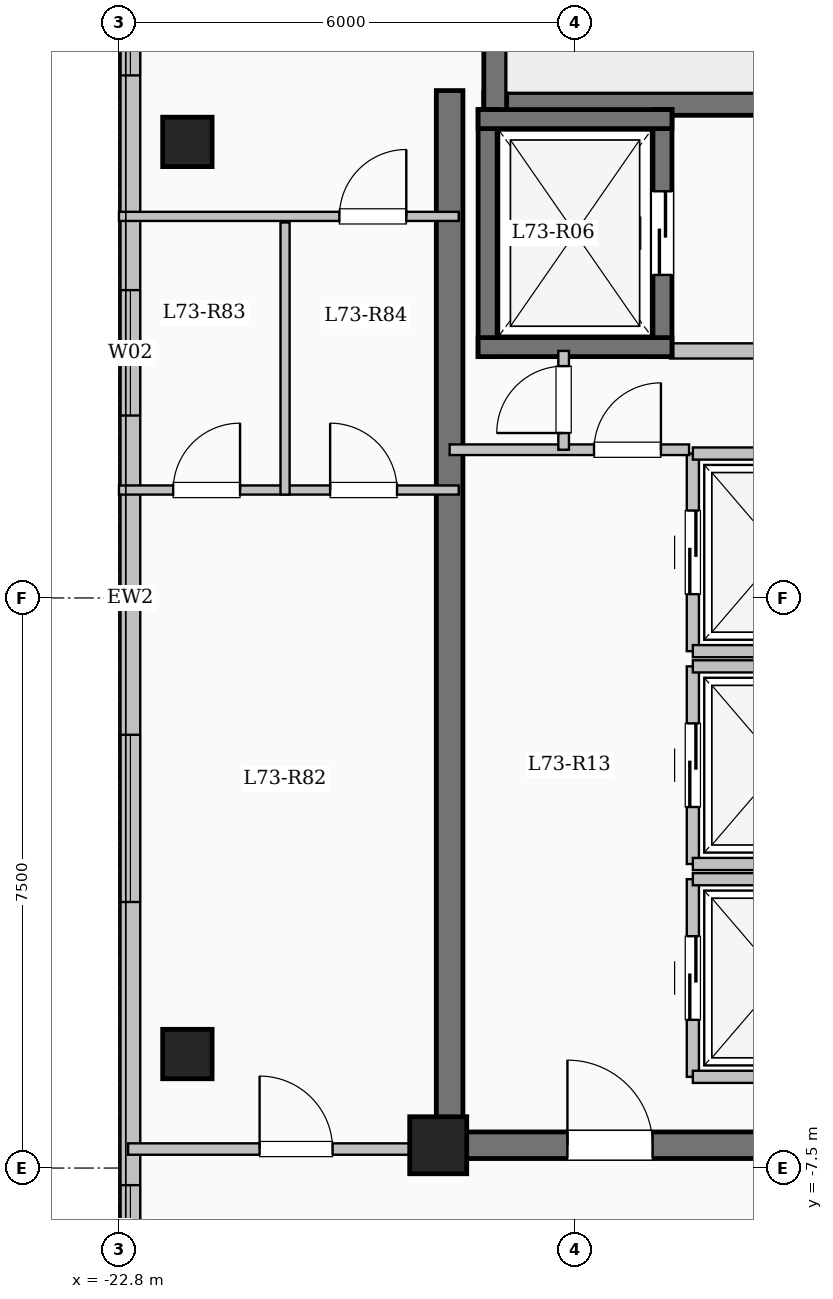
"""IFC4 building model, lengths in metres.
Left out: names, types, materials, properties, quantities, classifications, styles, units other than length and angle.
Written with IfcOpenShell. Run it as: python <this file> out.ifc"""

import sys

from ifc_helpers import new_model, si_unit, direction, frame, frame_2d, origin, origin_2d, place, context, subcontext, project, spatial, rectangle, extrude, element, fill, save


model = new_model("IFC4")
c1 = context("Model", 3, precision=1e-05, world=origin(), true_north=direction((0.0, 1.0)))
c2 = subcontext(c1, "Body", "Model", "MODEL_VIEW")
j1 = project(units=[si_unit("LENGTHUNIT", "METRE"), si_unit("PLANEANGLEUNIT", "RADIAN")], contexts=[c1])
p1 = place(None, origin())
s1 = spatial("IfcSite", under=j1, at=p1, CompositionType="ELEMENT")
p2 = place(p1, origin())
s2 = spatial("IfcBuilding", under=s1, at=p2, CompositionType="ELEMENT")
p3 = place(p2, frame((0.0, 0.0, 268.3)))
s3 = spatial("IfcBuildingStorey", under=s2, at=p3, CompositionType="ELEMENT", Elevation=268.3)
p4 = place(p3, frame((-18.6, -7.2, 0.0), z_axis=(0.0, 0.0, 1.0), x_axis=(1.0, 0.0, 0.0)))
e1 = element("IfcColumn", 1, at=p4, inside=s3, PredefinedType="COLUMN", context=c2, shape_type="SweptSolid", body=[
    extrude(rectangle(XDim=0.75, YDim=0.75, at=origin_2d()), origin(), (0.0, 0.0, 1.0), 3.35),
])
for number, where, z_axis, x_axis in (
    (2, (-21.9, -6.0, 0.0), (0.0, 0.0, 1.0), (1.0, 0.0, 0.0)),
    (3, (-21.9, 6.0, 0.0), (0.0, 0.0, 1.0), (1.0, 0.0, 0.0)),
):
    element("IfcColumn", number, at=place(p3, frame(where, z_axis=z_axis, x_axis=x_axis)), inside=s3, PredefinedType="COLUMN", context=c2, shape_type="SweptSolid", body=[
        extrude(rectangle(XDim=0.65, YDim=0.65, at=origin_2d()), origin(), (0.0, 0.0, 1.0), 3.35),
    ])
p5 = place(p3, frame((-22.65, -17.55, 0.0), z_axis=(0.0, 0.0, 1.0), x_axis=(0.0, 1.0, 0.0)))
e4 = element("IfcWall", 4, at=p5, inside=s3, PredefinedType="SOLIDWALL", context=c2, shape_type="SweptSolid", body=[
    extrude(rectangle(XDim=35.1, YDim=0.26, at=frame_2d((17.55, 0.0))), origin(), (0.0, 0.0, 1.0), 3.05),
])
p6 = place(p5, frame((2.975, 0.0, 0.9)))
e5 = element("IfcOpeningElement", 5, at=p6, cuts=e4, PredefinedType="OPENING", context=c2, shape_type="SweptSolid", body=[
    extrude(rectangle(XDim=2.2, YDim=1.75, at=frame_2d((1.1, 0.875))), frame((0.0, 0.14, 0.0), z_axis=(0.0, -1.0, 0.0), x_axis=(1.0, 0.0, 0.0)), (0.0, 0.0, 1.0), 0.28),
])
p7 = place(p5, frame((8.625, 0.0, 0.95)))
e6 = element("IfcOpeningElement", 6, at=p7, cuts=e4, PredefinedType="OPENING", context=c2, shape_type="SweptSolid", body=[
    extrude(rectangle(XDim=1.2, YDim=1.5, at=frame_2d((0.6, 0.75))), frame((0.0, 0.14, 0.0), z_axis=(0.0, -1.0, 0.0), x_axis=(1.0, 0.0, 0.0)), (0.0, 0.0, 1.0), 0.28),
])
p8 = place(p5, frame((13.55, 0.0, 0.9)))
e7 = element("IfcOpeningElement", 7, at=p8, cuts=e4, PredefinedType="OPENING", context=c2, shape_type="SweptSolid", body=[
    extrude(rectangle(XDim=2.2, YDim=1.75, at=frame_2d((1.1, 0.875))), frame((0.0, 0.14, 0.0), z_axis=(0.0, -1.0, 0.0), x_axis=(1.0, 0.0, 0.0)), (0.0, 0.0, 1.0), 0.28),
])
p9 = place(p5, frame((19.95, 0.0, 0.9)))
e8 = element("IfcOpeningElement", 8, at=p9, cuts=e4, PredefinedType="OPENING", context=c2, shape_type="SweptSolid", body=[
    extrude(rectangle(XDim=1.65, YDim=1.6, at=frame_2d((0.825, 0.8))), frame((0.0, 0.14, 0.0), z_axis=(0.0, -1.0, 0.0), x_axis=(1.0, 0.0, 0.0)), (0.0, 0.0, 1.0), 0.28),
])
p10 = place(p5, frame((24.425, 0.0, 0.9)))
e9 = element("IfcOpeningElement", 9, at=p10, cuts=e4, PredefinedType="OPENING", context=c2, shape_type="SweptSolid", body=[
    extrude(rectangle(XDim=2.0, YDim=1.7, at=frame_2d((1.0, 0.85))), frame((0.0, 0.14, 0.0), z_axis=(0.0, -1.0, 0.0), x_axis=(1.0, 0.0, 0.0)), (0.0, 0.0, 1.0), 0.28),
])
p11 = place(p5, frame((28.675, 0.0, 0.95)))
e10 = element("IfcOpeningElement", 10, at=p11, cuts=e4, PredefinedType="OPENING", context=c2, shape_type="SweptSolid", body=[
    extrude(rectangle(XDim=1.0, YDim=1.5, at=frame_2d((0.5, 0.75))), frame((0.0, 0.14, 0.0), z_axis=(0.0, -1.0, 0.0), x_axis=(1.0, 0.0, 0.0)), (0.0, 0.0, 1.0), 0.28),
])
p12 = place(p5, frame((31.6, 0.0, 0.9)))
e11 = element("IfcOpeningElement", 11, at=p12, cuts=e4, PredefinedType="OPENING", context=c2, shape_type="SweptSolid", body=[
    extrude(rectangle(XDim=2.0, YDim=1.7, at=frame_2d((1.0, 0.85))), frame((0.0, 0.14, 0.0), z_axis=(0.0, -1.0, 0.0), x_axis=(1.0, 0.0, 0.0)), (0.0, 0.0, 1.0), 0.28),
])
p13 = place(p3, frame((-18.0, 6.5, 0.0), z_axis=(0.0, 0.0, 1.0), x_axis=(1.0, 0.0, 0.0)))
e12 = element("IfcWall", 12, at=p13, inside=s3, PredefinedType="SHEAR", context=c2, shape_type="SweptSolid", body=[
    extrude(rectangle(XDim=8.0, YDim=0.3, at=frame_2d((4.0, 0.0))), origin(), (0.0, 0.0, 1.0), 3.35),
])
p14 = place(p13, frame((6.45, 0.0, 0.0)))
e13 = element("IfcOpeningElement", 13, at=p14, cuts=e12, PredefinedType="OPENING", context=c2, shape_type="SweptSolid", body=[
    extrude(rectangle(XDim=1.0, YDim=2.15, at=frame_2d((0.5, 1.075))), frame((0.0, 0.16, 0.0), z_axis=(0.0, -1.0, 0.0), x_axis=(1.0, 0.0, 0.0)), (0.0, 0.0, 1.0), 0.32),
])
p15 = place(p3, frame((-17.85, 6.35, 0.0), z_axis=(0.0, 0.0, 1.0), x_axis=(0.0, 1.0, 0.0)))
e14 = element("IfcWall", 14, at=p15, inside=s3, PredefinedType="SHEAR", context=c2, shape_type="SweptSolid", body=[
    extrude(rectangle(XDim=3.59, YDim=0.3, at=frame_2d((1.795, 0.0))), origin(), (0.0, 0.0, 1.0), 3.35),
])
p16 = place(p3, frame((-15.55, 3.25, 0.0), z_axis=(0.0, 0.0, 1.0), x_axis=(1.0, 0.0, 0.0)))
e15 = element("IfcWall", 15, at=p16, inside=s3, PredefinedType="SOLIDWALL", context=c2, shape_type="SweptSolid", body=[
    extrude(rectangle(XDim=5.4, YDim=0.2, at=frame_2d((2.7, 0.0))), origin(), (0.0, 0.0, 1.0), 3.05),
])
p17 = place(p3, frame((-17.95, 3.175, 0.0), z_axis=(0.0, 0.0, 1.0), x_axis=(0.0, 1.0, 0.0)))
e16 = element("IfcWall", 16, at=p17, inside=s3, PredefinedType="SHEAR", context=c2, shape_type="SweptSolid", body=[
    extrude(rectangle(XDim=3.25, YDim=0.25, at=frame_2d((1.625, 0.0))), origin(), (0.0, 0.0, 1.0), 3.35),
])
p18 = place(p3, frame((-15.65, 3.175, 0.0), z_axis=(0.0, 0.0, 1.0), x_axis=(0.0, 1.0, 0.0)))
e17 = element("IfcWall", 17, at=p18, inside=s3, PredefinedType="SHEAR", context=c2, shape_type="SweptSolid", body=[
    extrude(rectangle(XDim=3.25, YDim=0.25, at=frame_2d((1.625, 0.0))), origin(), (0.0, 0.0, 1.0), 3.35),
])
p19 = place(p18, frame((1.075, 0.0, 0.0)))
e18 = element("IfcOpeningElement", 18, at=p19, cuts=e17, PredefinedType="OPENING", context=c2, shape_type="SweptSolid", body=[
    extrude(rectangle(XDim=1.1, YDim=2.15, at=frame_2d((0.55, 1.075))), frame((0.0, 0.135, 0.0), z_axis=(0.0, -1.0, 0.0), x_axis=(1.0, 0.0, 0.0)), (0.0, 0.0, 1.0), 0.27),
])
for number, where, z_axis, x_axis in (
    (19, (-18.075, 3.3, 0.0), (0.0, 0.0, 1.0), (1.0, 0.0, 0.0)),
    (20, (-18.075, 6.3, 0.0), (0.0, 0.0, 1.0), (1.0, 0.0, 0.0)),
):
    element("IfcWall", number, at=place(p3, frame(where, z_axis=z_axis, x_axis=x_axis)), inside=s3, PredefinedType="SHEAR", context=c2, shape_type="SweptSolid", body=[
        extrude(rectangle(XDim=2.55, YDim=0.25, at=frame_2d((1.275, 0.0))), origin(), (0.0, 0.0, 1.0), 3.35),
    ])
p20 = place(p3, frame((-15.25, -6.3, 0.0), z_axis=(0.0, 0.0, 1.0), x_axis=(0.0, 1.0, 0.0)))
e21 = element("IfcWall", 21, at=p20, inside=s3, PredefinedType="SOLIDWALL", context=c2, shape_type="SweptSolid", body=[
    extrude(rectangle(XDim=2.6, YDim=0.16, at=frame_2d((1.3, 0.0))), origin(), (0.0, 0.0, 1.0), 3.05),
])
p21 = place(p20, frame((0.75, 0.0, 0.0)))
e22 = element("IfcOpeningElement", 22, at=p21, cuts=e21, PredefinedType="OPENING", context=c2, shape_type="SweptSolid", body=[
    extrude(rectangle(XDim=1.1, YDim=2.15, at=frame_2d((0.55, 1.075))), frame((0.0, 0.09, 0.0), z_axis=(0.0, -1.0, 0.0), x_axis=(1.0, 0.0, 0.0)), (0.0, 0.0, 1.0), 0.18),
])
for number, where, z_axis, x_axis in (
    (23, (-15.25, -6.3, 0.0), (0.0, 0.0, 1.0), (1.0, 0.0, 0.0)),
    (24, (-15.25, -3.7, 0.0), (0.0, 0.0, 1.0), (1.0, 0.0, 0.0)),
):
    element("IfcWall", number, at=place(p3, frame(where, z_axis=z_axis, x_axis=x_axis)), inside=s3, PredefinedType="SOLIDWALL", context=c2, shape_type="SweptSolid", body=[
        extrude(rectangle(XDim=2.3, YDim=0.16, at=frame_2d((1.15, 0.0))), origin(), (0.0, 0.0, 1.0), 3.05),
    ])
p22 = place(p3, frame((-15.25, -3.5, 0.0), z_axis=(0.0, 0.0, 1.0), x_axis=(0.0, 1.0, 0.0)))
e25 = element("IfcWall", 25, at=p22, inside=s3, PredefinedType="SOLIDWALL", context=c2, shape_type="SweptSolid", body=[
    extrude(rectangle(XDim=2.6, YDim=0.16, at=frame_2d((1.3, 0.0))), origin(), (0.0, 0.0, 1.0), 3.05),
])
p23 = place(p22, frame((0.75, 0.0, 0.0)))
e26 = element("IfcOpeningElement", 26, at=p23, cuts=e25, PredefinedType="OPENING", context=c2, shape_type="SweptSolid", body=[
    extrude(rectangle(XDim=1.1, YDim=2.15, at=frame_2d((0.55, 1.075))), frame((0.0, 0.09, 0.0), z_axis=(0.0, -1.0, 0.0), x_axis=(1.0, 0.0, 0.0)), (0.0, 0.0, 1.0), 0.18),
])
for number, where, z_axis, x_axis in (
    (27, (-15.25, -3.5, 0.0), (0.0, 0.0, 1.0), (1.0, 0.0, 0.0)),
    (28, (-15.25, -0.9, 0.0), (0.0, 0.0, 1.0), (1.0, 0.0, 0.0)),
):
    element("IfcWall", number, at=place(p3, frame(where, z_axis=z_axis, x_axis=x_axis)), inside=s3, PredefinedType="SOLIDWALL", context=c2, shape_type="SweptSolid", body=[
        extrude(rectangle(XDim=2.3, YDim=0.16, at=frame_2d((1.15, 0.0))), origin(), (0.0, 0.0, 1.0), 3.05),
    ])
p24 = place(p3, frame((-15.25, -0.7, 0.0), z_axis=(0.0, 0.0, 1.0), x_axis=(0.0, 1.0, 0.0)))
e29 = element("IfcWall", 29, at=p24, inside=s3, PredefinedType="SOLIDWALL", context=c2, shape_type="SweptSolid", body=[
    extrude(rectangle(XDim=2.6, YDim=0.16, at=frame_2d((1.3, 0.0))), origin(), (0.0, 0.0, 1.0), 3.05),
])
p25 = place(p24, frame((0.75, 0.0, 0.0)))
e30 = element("IfcOpeningElement", 30, at=p25, cuts=e29, PredefinedType="OPENING", context=c2, shape_type="SweptSolid", body=[
    extrude(rectangle(XDim=1.1, YDim=2.15, at=frame_2d((0.55, 1.075))), frame((0.0, 0.09, 0.0), z_axis=(0.0, -1.0, 0.0), x_axis=(1.0, 0.0, 0.0)), (0.0, 0.0, 1.0), 0.18),
])
for number, where, z_axis, x_axis in (
    (31, (-15.25, -0.7, 0.0), (0.0, 0.0, 1.0), (1.0, 0.0, 0.0)),
    (32, (-15.25, 1.9, 0.0), (0.0, 0.0, 1.0), (1.0, 0.0, 0.0)),
):
    element("IfcWall", number, at=place(p3, frame(where, z_axis=z_axis, x_axis=x_axis)), inside=s3, PredefinedType="SOLIDWALL", context=c2, shape_type="SweptSolid", body=[
        extrude(rectangle(XDim=2.3, YDim=0.16, at=frame_2d((1.15, 0.0))), origin(), (0.0, 0.0, 1.0), 3.05),
    ])
p26 = place(p3, frame((-18.45, -7.375, 0.0), z_axis=(0.0, 0.0, 1.0), x_axis=(0.0, 1.0, 0.0)))
e33 = element("IfcWall", 33, at=p26, inside=s3, PredefinedType="SHEAR", context=c2, shape_type="SweptSolid", body=[
    extrude(rectangle(XDim=14.05, YDim=0.35, at=frame_2d((7.025, 0.0))), origin(), (0.0, 0.0, 1.0), 3.35),
])
p27 = place(p3, frame((-18.625, -7.2, 0.0), z_axis=(0.0, 0.0, 1.0), x_axis=(1.0, 0.0, 0.0)))
e34 = element("IfcWall", 34, at=p27, inside=s3, PredefinedType="SHEAR", context=c2, shape_type="SweptSolid", body=[
    extrude(rectangle(XDim=8.55, YDim=0.35, at=frame_2d((4.275, 0.0))), origin(), (0.0, 0.0, 1.0), 3.35),
])
p28 = place(p27, frame((1.725, 0.0, 0.0)))
e35 = element("IfcOpeningElement", 35, at=p28, cuts=e34, PredefinedType="OPENING", context=c2, shape_type="SweptSolid", body=[
    extrude(rectangle(XDim=1.12, YDim=2.15, at=frame_2d((0.56, 1.075))), frame((0.0, 0.185, 0.0), z_axis=(0.0, -1.0, 0.0), x_axis=(1.0, 0.0, 0.0)), (0.0, 0.0, 1.0), 0.37),
])
p29 = place(p3, frame((-18.45, 1.95, 0.0), z_axis=(0.0, 0.0, 1.0), x_axis=(1.0, 0.0, 0.0)))
e36 = element("IfcWall", 36, at=p29, inside=s3, PredefinedType="PARTITIONING", context=c2, shape_type="SweptSolid", body=[
    extrude(rectangle(XDim=3.15, YDim=0.14, at=frame_2d((1.575, 0.0))), origin(), (0.0, 0.0, 1.0), 3.05),
])
p30 = place(p29, frame((1.9, 0.0, 0.0)))
e37 = element("IfcOpeningElement", 37, at=p30, cuts=e36, PredefinedType="OPENING", context=c2, shape_type="SweptSolid", body=[
    extrude(rectangle(XDim=0.88, YDim=2.1, at=frame_2d((0.44, 1.05))), frame((0.0, 0.08, 0.0), z_axis=(0.0, -1.0, 0.0), x_axis=(1.0, 0.0, 0.0)), (0.0, 0.0, 1.0), 0.16),
])
p31 = place(p3, frame((-16.95, 1.95, 0.0), z_axis=(0.0, 0.0, 1.0), x_axis=(0.0, 1.0, 0.0)))
e38 = element("IfcWall", 38, at=p31, inside=s3, PredefinedType="PARTITIONING", context=c2, shape_type="SweptSolid", body=[
    extrude(rectangle(XDim=1.3, YDim=0.14, at=frame_2d((0.65, 0.0))), origin(), (0.0, 0.0, 1.0), 3.05),
])
p32 = place(p31, frame((0.22, 0.0, 0.0)))
e39 = element("IfcOpeningElement", 39, at=p32, cuts=e38, PredefinedType="OPENING", context=c2, shape_type="SweptSolid", body=[
    extrude(rectangle(XDim=0.88, YDim=2.1, at=frame_2d((0.44, 1.05))), frame((0.0, 0.08, 0.0), z_axis=(0.0, -1.0, 0.0), x_axis=(1.0, 0.0, 0.0)), (0.0, 0.0, 1.0), 0.16),
])
p33 = place(p3, frame((-22.68, -7.25, 0.0), z_axis=(0.0, 0.0, 1.0), x_axis=(1.0, 0.0, 0.0)))
e40 = element("IfcWall", 40, at=p33, inside=s3, PredefinedType="PARTITIONING", context=c2, shape_type="SweptSolid", body=[
    extrude(rectangle(XDim=4.23, YDim=0.15, at=frame_2d((2.115, 0.0))), origin(), (0.0, 0.0, 1.0), 3.05),
])
p34 = place(p33, frame((1.73, 0.0, 0.0)))
e41 = element("IfcOpeningElement", 41, at=p34, cuts=e40, PredefinedType="OPENING", context=c2, shape_type="SweptSolid", body=[
    extrude(rectangle(XDim=0.96, YDim=2.15, at=frame_2d((0.48, 1.075))), frame((0.0, 0.085, 0.0), z_axis=(0.0, -1.0, 0.0), x_axis=(1.0, 0.0, 0.0)), (0.0, 0.0, 1.0), 0.17),
])
p35 = place(p3, frame((-22.8, 1.42, 0.0), z_axis=(0.0, 0.0, 1.0), x_axis=(1.0, 0.0, 0.0)))
e42 = element("IfcWall", 42, at=p35, inside=s3, PredefinedType="PARTITIONING", context=c2, shape_type="SweptSolid", body=[
    extrude(rectangle(XDim=4.47, YDim=0.12, at=frame_2d((2.235, 0.0))), origin(), (0.0, 0.0, 1.0), 3.05),
])
p36 = place(p35, frame((0.713, 0.0, 0.0)))
e43 = element("IfcOpeningElement", 43, at=p36, cuts=e42, PredefinedType="OPENING", context=c2, shape_type="SweptSolid", body=[
    extrude(rectangle(XDim=0.88, YDim=2.1, at=frame_2d((0.44, 1.05))), frame((0.0, 0.07, 0.0), z_axis=(0.0, -1.0, 0.0), x_axis=(1.0, 0.0, 0.0)), (0.0, 0.0, 1.0), 0.14),
])
p37 = place(p35, frame((2.778, 0.0, 0.0)))
e44 = element("IfcOpeningElement", 44, at=p37, cuts=e42, PredefinedType="OPENING", context=c2, shape_type="SweptSolid", body=[
    extrude(rectangle(XDim=0.88, YDim=2.1, at=frame_2d((0.44, 1.05))), frame((0.0, 0.07, 0.0), z_axis=(0.0, -1.0, 0.0), x_axis=(1.0, 0.0, 0.0)), (0.0, 0.0, 1.0), 0.14),
])
p38 = place(p3, frame((-22.8, 5.02, 0.0), z_axis=(0.0, 0.0, 1.0), x_axis=(1.0, 0.0, 0.0)))
e45 = element("IfcWall", 45, at=p38, inside=s3, PredefinedType="PARTITIONING", context=c2, shape_type="SweptSolid", body=[
    extrude(rectangle(XDim=4.47, YDim=0.12, at=frame_2d((2.235, 0.0))), origin(), (0.0, 0.0, 1.0), 3.05),
])
p39 = place(p38, frame((2.9, 0.0, 0.0)))
e46 = element("IfcOpeningElement", 46, at=p39, cuts=e45, PredefinedType="OPENING", context=c2, shape_type="SweptSolid", body=[
    extrude(rectangle(XDim=0.88, YDim=2.1, at=frame_2d((0.44, 1.05))), frame((0.0, 0.07, 0.0), z_axis=(0.0, -1.0, 0.0), x_axis=(1.0, 0.0, 0.0)), (0.0, 0.0, 1.0), 0.14),
])
p40 = place(p3, frame((-20.615, 1.36, 0.0), z_axis=(0.0, 0.0, 1.0), x_axis=(0.0, 1.0, 0.0)))
e47 = element("IfcWall", 47, at=p40, inside=s3, PredefinedType="PARTITIONING", context=c2, shape_type="SweptSolid", body=[
    extrude(rectangle(XDim=3.58, YDim=0.12, at=frame_2d((1.79, 0.0))), origin(), (0.0, 0.0, 1.0), 3.05),
])
p41 = place(p7, origin())
e48 = element("IfcWindow", 48, at=p41, inside=s3, PartitioningType="SINGLE_PANEL", PredefinedType="WINDOW", context=c2, shape_type="SweptSolid", body=[
    extrude(rectangle(XDim=1.2, YDim=1.5, at=frame_2d((0.6, 0.75))), frame((0.0, 0.03, 0.0), z_axis=(0.0, -1.0, 0.0), x_axis=(1.0, 0.0, 0.0)), (0.0, 0.0, 1.0), 0.06),
])
fill(e6, e48)
p42 = place(p8, origin())
e49 = element("IfcWindow", 49, at=p42, inside=s3, PartitioningType="SINGLE_PANEL", PredefinedType="WINDOW", context=c2, shape_type="SweptSolid", body=[
    extrude(rectangle(XDim=2.2, YDim=1.75, at=frame_2d((1.1, 0.875))), frame((0.0, 0.03, 0.0), z_axis=(0.0, -1.0, 0.0), x_axis=(1.0, 0.0, 0.0)), (0.0, 0.0, 1.0), 0.06),
])
fill(e7, e49)
p43 = place(p9, origin())
e50 = element("IfcWindow", 50, at=p43, inside=s3, PartitioningType="SINGLE_PANEL", PredefinedType="WINDOW", context=c2, shape_type="SweptSolid", body=[
    extrude(rectangle(XDim=1.65, YDim=1.6, at=frame_2d((0.825, 0.8))), frame((0.0, 0.03, 0.0), z_axis=(0.0, -1.0, 0.0), x_axis=(1.0, 0.0, 0.0)), (0.0, 0.0, 1.0), 0.06),
])
fill(e8, e50)
p44 = place(p10, origin())
e51 = element("IfcWindow", 51, at=p44, inside=s3, PartitioningType="SINGLE_PANEL", PredefinedType="WINDOW", context=c2, shape_type="SweptSolid", body=[
    extrude(rectangle(XDim=2.0, YDim=1.7, at=frame_2d((1.0, 0.85))), frame((0.0, 0.03, 0.0), z_axis=(0.0, -1.0, 0.0), x_axis=(1.0, 0.0, 0.0)), (0.0, 0.0, 1.0), 0.06),
])
fill(e9, e51)
p45 = place(p19, origin())
e52 = element("IfcDoor", 52, at=p45, inside=s3, OperationType="SLIDING_TO_LEFT", PredefinedType="DOOR", context=c2, shape_type="SweptSolid", body=[
    extrude(rectangle(XDim=1.1, YDim=2.15, at=frame_2d((0.55, 1.075))), frame((0.0, 0.025, 0.0), z_axis=(0.0, -1.0, 0.0), x_axis=(1.0, 0.0, 0.0)), (0.0, 0.0, 1.0), 0.05),
])
fill(e18, e52)
p46 = place(p21, origin())
e53 = element("IfcDoor", 53, at=p46, inside=s3, OperationType="SLIDING_TO_LEFT", PredefinedType="DOOR", context=c2, shape_type="SweptSolid", body=[
    extrude(rectangle(XDim=1.1, YDim=2.15, at=frame_2d((0.55, 1.075))), frame((0.0, 0.025, 0.0), z_axis=(0.0, -1.0, 0.0), x_axis=(1.0, 0.0, 0.0)), (0.0, 0.0, 1.0), 0.05),
])
fill(e22, e53)
p47 = place(p23, origin())
e54 = element("IfcDoor", 54, at=p47, inside=s3, OperationType="SLIDING_TO_LEFT", PredefinedType="DOOR", context=c2, shape_type="SweptSolid", body=[
    extrude(rectangle(XDim=1.1, YDim=2.15, at=frame_2d((0.55, 1.075))), frame((0.0, 0.025, 0.0), z_axis=(0.0, -1.0, 0.0), x_axis=(1.0, 0.0, 0.0)), (0.0, 0.0, 1.0), 0.05),
])
fill(e26, e54)
p48 = place(p25, origin())
e55 = element("IfcDoor", 55, at=p48, inside=s3, OperationType="SLIDING_TO_LEFT", PredefinedType="DOOR", context=c2, shape_type="SweptSolid", body=[
    extrude(rectangle(XDim=1.1, YDim=2.15, at=frame_2d((0.55, 1.075))), frame((0.0, 0.025, 0.0), z_axis=(0.0, -1.0, 0.0), x_axis=(1.0, 0.0, 0.0)), (0.0, 0.0, 1.0), 0.05),
])
fill(e30, e55)
p49 = place(p28, origin())
e56 = element("IfcDoor", 56, at=p49, inside=s3, OperationType="SINGLE_SWING_LEFT", PredefinedType="DOOR", context=c2, shape_type="SweptSolid", body=[
    extrude(rectangle(XDim=1.12, YDim=2.15, at=frame_2d((0.56, 1.075))), frame((0.0, 0.025, 0.0), z_axis=(0.0, -1.0, 0.0), x_axis=(1.0, 0.0, 0.0)), (0.0, 0.0, 1.0), 0.05),
])
fill(e35, e56)
p50 = place(p30, origin())
e57 = element("IfcDoor", 57, at=p50, inside=s3, OperationType="SINGLE_SWING_RIGHT", PredefinedType="DOOR", context=c2, shape_type="SweptSolid", body=[
    extrude(rectangle(XDim=0.88, YDim=2.1, at=frame_2d((0.44, 1.05))), frame((0.0, 0.025, 0.0), z_axis=(0.0, -1.0, 0.0), x_axis=(1.0, 0.0, 0.0)), (0.0, 0.0, 1.0), 0.05),
])
fill(e37, e57)
p51 = place(p32, origin())
e58 = element("IfcDoor", 58, at=p51, inside=s3, OperationType="SINGLE_SWING_LEFT", PredefinedType="DOOR", context=c2, shape_type="SweptSolid", body=[
    extrude(rectangle(XDim=0.88, YDim=2.1, at=frame_2d((0.44, 1.05))), frame((0.0, 0.025, 0.0), z_axis=(0.0, -1.0, 0.0), x_axis=(1.0, 0.0, 0.0)), (0.0, 0.0, 1.0), 0.05),
])
fill(e39, e58)
p52 = place(p34, origin())
e59 = element("IfcDoor", 59, at=p52, inside=s3, OperationType="SINGLE_SWING_LEFT", PredefinedType="DOOR", context=c2, shape_type="SweptSolid", body=[
    extrude(rectangle(XDim=0.96, YDim=2.15, at=frame_2d((0.48, 1.075))), frame((0.0, 0.025, 0.0), z_axis=(0.0, -1.0, 0.0), x_axis=(1.0, 0.0, 0.0)), (0.0, 0.0, 1.0), 0.05),
])
fill(e41, e59)
p53 = place(p36, origin())
e60 = element("IfcDoor", 60, at=p53, inside=s3, OperationType="SINGLE_SWING_RIGHT", PredefinedType="DOOR", context=c2, shape_type="SweptSolid", body=[
    extrude(rectangle(XDim=0.88, YDim=2.1, at=frame_2d((0.44, 1.05))), frame((0.0, 0.025, 0.0), z_axis=(0.0, -1.0, 0.0), x_axis=(1.0, 0.0, 0.0)), (0.0, 0.0, 1.0), 0.05),
])
fill(e43, e60)
p54 = place(p37, origin())
e61 = element("IfcDoor", 61, at=p54, inside=s3, OperationType="SINGLE_SWING_LEFT", PredefinedType="DOOR", context=c2, shape_type="SweptSolid", body=[
    extrude(rectangle(XDim=0.88, YDim=2.1, at=frame_2d((0.44, 1.05))), frame((0.0, 0.025, 0.0), z_axis=(0.0, -1.0, 0.0), x_axis=(1.0, 0.0, 0.0)), (0.0, 0.0, 1.0), 0.05),
])
fill(e44, e61)
p55 = place(p39, origin())
e62 = element("IfcDoor", 62, at=p55, inside=s3, OperationType="SINGLE_SWING_RIGHT", PredefinedType="DOOR", context=c2, shape_type="SweptSolid", body=[
    extrude(rectangle(XDim=0.88, YDim=2.1, at=frame_2d((0.44, 1.05))), frame((0.0, 0.025, 0.0), z_axis=(0.0, -1.0, 0.0), x_axis=(1.0, 0.0, 0.0)), (0.0, 0.0, 1.0), 0.05),
])
fill(e46, e62)
save(model, sys.argv[1])
